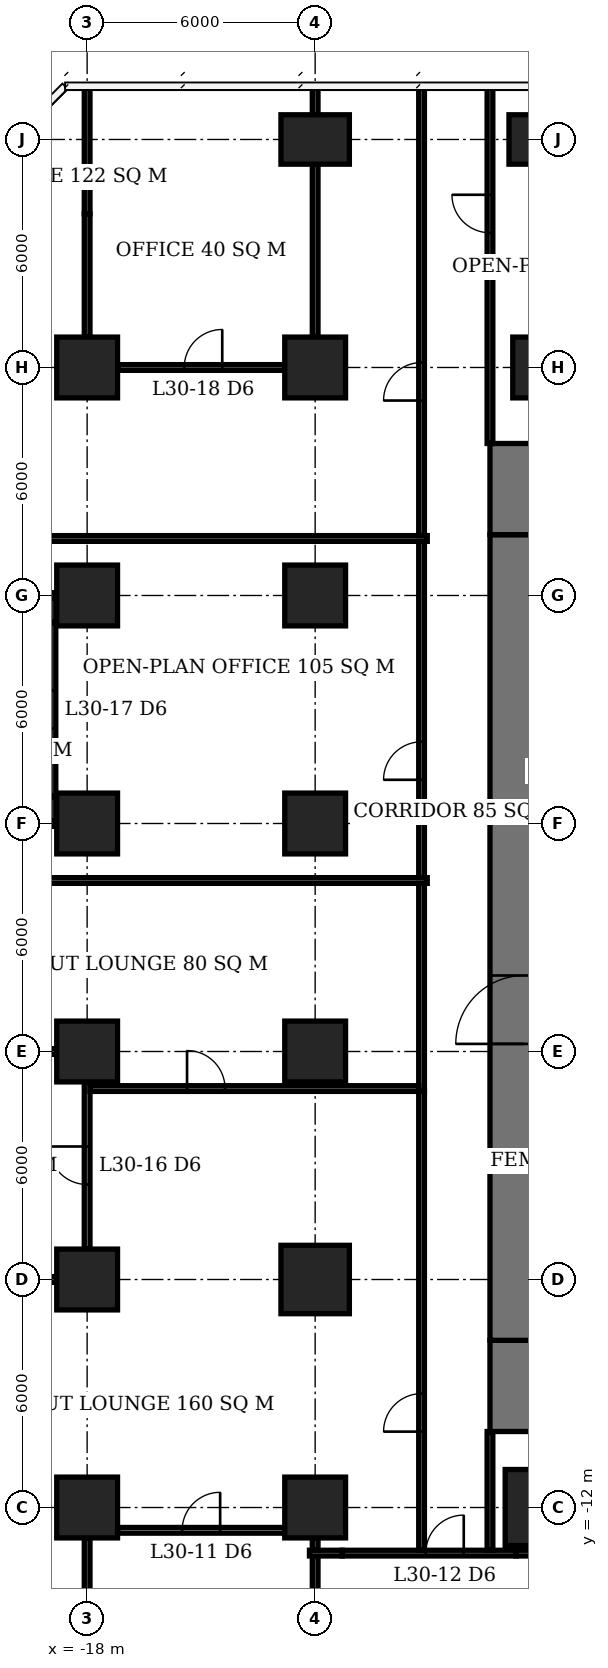
"""IFC4 building model, lengths in metres.
Left out: names, types, materials, properties, quantities, classifications, styles, units other than length and angle.
Written with IfcOpenShell. Run it as: python <this file> out.ifc"""

import sys

from ifc_helpers import new_model, si_unit, direction, frame, frame_2d, origin, origin_2d, place, context, subcontext, project, spatial, rectangle, extrude, element, fill, save


model = new_model("IFC4")
c1 = context("Model", 3, precision=1e-05, world=origin(), true_north=direction((0.0, 1.0)))
c2 = subcontext(c1, "Body", "Model", "MODEL_VIEW")
j1 = project(units=[si_unit("LENGTHUNIT", "METRE"), si_unit("PLANEANGLEUNIT", "RADIAN")], contexts=[c1])
p1 = place(None, origin())
s1 = spatial("IfcSite", under=j1, at=p1, CompositionType="ELEMENT")
p2 = place(p1, origin())
s2 = spatial("IfcBuilding", under=s1, at=p2, CompositionType="ELEMENT")
p3 = place(p2, frame((0.0, 0.0, 125.0)))
s3 = spatial("IfcBuildingStorey", under=s2, at=p3, CompositionType="ELEMENT", Elevation=125.0)
for number, where, z_axis, x_axis in (
    (1, (-18.0, -12.0, 0.0), (0.0, 0.0, 1.0), (1.0, 0.0, 0.0)),
    (2, (-18.0, -6.0, 0.0), (0.0, 0.0, 1.0), (1.0, 0.0, 0.0)),
    (3, (-18.0, 0.0, 0.0), (0.0, 0.0, 1.0), (1.0, 0.0, 0.0)),
    (4, (-18.0, 6.0, 0.0), (0.0, 0.0, 1.0), (1.0, 0.0, 0.0)),
    (5, (-18.0, 12.0, 0.0), (0.0, 0.0, 1.0), (1.0, 0.0, 0.0)),
    (6, (-18.0, 18.0, 0.0), (0.0, 0.0, 1.0), (1.0, 0.0, 0.0)),
    (7, (-12.0, -12.0, 0.0), (0.0, 0.0, 1.0), (1.0, 0.0, 0.0)),
):
    element("IfcColumn", number, at=place(p3, frame(where, z_axis=z_axis, x_axis=x_axis)), inside=s3, PredefinedType="COLUMN", context=c2, shape_type="SweptSolid", body=[
        extrude(rectangle(XDim=1.6, YDim=1.6, at=origin_2d()), origin(), (0.0, 0.0, 1.0), 3.9),
    ])
p4 = place(p3, frame((-12.0, -6.0, 0.0), z_axis=(0.0, 0.0, 1.0), x_axis=(1.0, 0.0, 0.0)))
e8 = element("IfcColumn", 8, at=p4, inside=s3, PredefinedType="COLUMN", context=c2, shape_type="SweptSolid", body=[
    extrude(rectangle(XDim=1.8, YDim=1.8, at=origin_2d()), origin(), (0.0, 0.0, 1.0), 3.9),
])
for number, where, z_axis, x_axis in (
    (9, (-12.0, 0.0, 0.0), (0.0, 0.0, 1.0), (1.0, 0.0, 0.0)),
    (10, (-12.0, 6.0, 0.0), (0.0, 0.0, 1.0), (1.0, 0.0, 0.0)),
    (11, (-12.0, 12.0, 0.0), (0.0, 0.0, 1.0), (1.0, 0.0, 0.0)),
    (12, (-12.0, 18.0, 0.0), (0.0, 0.0, 1.0), (1.0, 0.0, 0.0)),
):
    element("IfcColumn", number, at=place(p3, frame(where, z_axis=z_axis, x_axis=x_axis)), inside=s3, PredefinedType="COLUMN", context=c2, shape_type="SweptSolid", body=[
        extrude(rectangle(XDim=1.6, YDim=1.6, at=origin_2d()), origin(), (0.0, 0.0, 1.0), 3.9),
    ])
p5 = place(p3, frame((-12.0, 24.0, 0.0), z_axis=(0.0, 0.0, 1.0), x_axis=(1.0, 0.0, 0.0)))
e13 = element("IfcColumn", 13, at=p5, inside=s3, PredefinedType="COLUMN", context=c2, shape_type="SweptSolid", body=[
    extrude(rectangle(XDim=1.8, YDim=1.3, at=origin_2d()), origin(), (0.0, 0.0, 1.0), 3.9),
])
p6 = place(p3, frame((-6.0, -12.0, 0.0), z_axis=(0.0, 0.0, 1.0), x_axis=(1.0, 0.0, 0.0)))
e14 = element("IfcColumn", 14, at=p6, inside=s3, PredefinedType="COLUMN", context=c2, shape_type="SweptSolid", body=[
    extrude(rectangle(XDim=2.0, YDim=2.0, at=origin_2d()), origin(), (0.0, 0.0, 1.0), 3.9),
])
p7 = place(p3, frame((-6.0, 18.0, 0.0), z_axis=(0.0, 0.0, 1.0), x_axis=(1.0, 0.0, 0.0)))
e15 = element("IfcColumn", 15, at=p7, inside=s3, PredefinedType="COLUMN", context=c2, shape_type="SweptSolid", body=[
    extrude(rectangle(XDim=1.6, YDim=1.6, at=origin_2d()), origin(), (0.0, 0.0, 1.0), 3.9),
])
p8 = place(p3, frame((-6.0, 24.0, 0.0), z_axis=(0.0, 0.0, 1.0), x_axis=(1.0, 0.0, 0.0)))
e16 = element("IfcColumn", 16, at=p8, inside=s3, PredefinedType="COLUMN", context=c2, shape_type="SweptSolid", body=[
    extrude(rectangle(XDim=1.8, YDim=1.3, at=origin_2d()), origin(), (0.0, 0.0, 1.0), 3.9),
])
p9 = place(p3, frame((-6.5, -7.6, 0.0), z_axis=(0.0, 0.0, 1.0), x_axis=(0.0, 1.0, 0.0)))
e17 = element("IfcWall", 17, at=p9, inside=s3, PredefinedType="SHEAR", context=c2, shape_type="SweptSolid", body=[
    extrude(rectangle(XDim=21.2, YDim=1.8, at=frame_2d((10.6, 0.0))), origin(), (0.0, 0.0, 1.0), 3.9),
])
p10 = place(p9, frame((7.8, 0.0, 0.0)))
e18 = element("IfcOpeningElement", 18, at=p10, cuts=e17, PredefinedType="OPENING", context=c2, shape_type="SweptSolid", body=[
    extrude(rectangle(XDim=1.8, YDim=2.4, at=frame_2d((0.9, 1.2))), frame((0.0, 0.91, 0.0), z_axis=(0.0, -1.0, 0.0), x_axis=(1.0, 0.0, 0.0)), (0.0, 0.0, 1.0), 1.82),
])
for number, where, z_axis, x_axis in (
    (19, (-6.5, -10.0, 0.0), (0.0, 0.0, 1.0), (0.0, 1.0, 0.0)),
    (20, (-6.5, 13.6, 0.0), (0.0, 0.0, 1.0), (0.0, 1.0, 0.0)),
):
    element("IfcWall", number, at=place(p3, frame(where, z_axis=z_axis, x_axis=x_axis)), inside=s3, PredefinedType="SHEAR", context=c2, shape_type="SweptSolid", body=[
        extrude(rectangle(XDim=2.4, YDim=1.8, at=frame_2d((1.2, 0.0))), origin(), (0.0, 0.0, 1.0), 3.9),
    ])
p11 = place(p3, frame((-12.15, -13.2, 0.0), z_axis=(0.0, 0.0, 1.0), x_axis=(1.0, 0.0, 0.0)))
e21 = element("IfcWall", 21, at=p11, inside=s3, PredefinedType="PARTITIONING", context=c2, shape_type="SweptSolid", body=[
    extrude(rectangle(XDim=0.86, YDim=0.15, at=frame_2d((0.43, 0.0))), origin(), (0.0, 0.0, 1.0), 2.65),
])
p12 = place(p3, frame((-11.29, -13.2, 0.0), z_axis=(0.0, 0.0, 1.0), x_axis=(1.0, 0.0, 0.0)))
e22 = element("IfcWall", 22, at=p12, inside=s3, PredefinedType="PARTITIONING", context=c2, shape_type="SweptSolid", body=[
    extrude(rectangle(XDim=4.58, YDim=0.15, at=frame_2d((2.29, 0.0))), origin(), (0.0, 0.0, 1.0), 3.65),
])
p13 = place(p12, frame((2.2, 0.0, 0.0)))
e23 = element("IfcOpeningElement", 23, at=p13, cuts=e22, PredefinedType="OPENING", context=c2, shape_type="SweptSolid", body=[
    extrude(rectangle(XDim=1.0, YDim=2.1, at=frame_2d((0.5, 1.05))), frame((0.0, 0.085, 0.0), z_axis=(0.0, -1.0, 0.0), x_axis=(1.0, 0.0, 0.0)), (0.0, 0.0, 1.0), 0.17),
])
p14 = place(p3, frame((-6.71, -13.2, 0.0), z_axis=(0.0, 0.0, 1.0), x_axis=(1.0, 0.0, 0.0)))
e24 = element("IfcWall", 24, at=p14, inside=s3, PredefinedType="PARTITIONING", context=c2, shape_type="SweptSolid", body=[
    extrude(rectangle(XDim=0.785, YDim=0.15, at=frame_2d((0.393, 0.0))), origin(), (0.0, 0.0, 1.0), 2.65),
])
p15 = place(p3, frame((-17.2, -12.6, 0.0), z_axis=(0.0, 0.0, 1.0), x_axis=(1.0, 0.0, 0.0)))
e25 = element("IfcWall", 25, at=p15, inside=s3, PredefinedType="PARTITIONING", context=c2, shape_type="SweptSolid", body=[
    extrude(rectangle(XDim=4.4, YDim=0.15, at=frame_2d((2.2, 0.0))), origin(), (0.0, 0.0, 1.0), 3.65),
])
p16 = place(p15, frame((1.7, 0.0, 0.0)))
e26 = element("IfcOpeningElement", 26, at=p16, cuts=e25, PredefinedType="OPENING", context=c2, shape_type="SweptSolid", body=[
    extrude(rectangle(XDim=1.0, YDim=2.1, at=frame_2d((0.5, 1.05))), frame((0.0, 0.085, 0.0), z_axis=(0.0, -1.0, 0.0), x_axis=(1.0, 0.0, 0.0)), (0.0, 0.0, 1.0), 0.17),
])
for number, where, z_axis, x_axis in (
    (27, (-22.31, -6.0, 0.0), (0.0, 0.0, 1.0), (1.0, 0.0, 0.0)),
    (28, (-22.31, 0.0, 0.0), (0.0, 0.0, 1.0), (1.0, 0.0, 0.0)),
):
    element("IfcWall", number, at=place(p3, frame(where, z_axis=z_axis, x_axis=x_axis)), inside=s3, PredefinedType="PARTITIONING", context=c2, shape_type="SweptSolid", body=[
        extrude(rectangle(XDim=3.51, YDim=0.15, at=frame_2d((1.755, 0.0))), origin(), (0.0, 0.0, 1.0), 2.65),
    ])
for number, where, z_axis, x_axis in (
    (29, (-22.31, 6.0, 0.0), (0.0, 0.0, 1.0), (1.0, 0.0, 0.0)),
    (30, (-22.31, 12.0, 0.0), (0.0, 0.0, 1.0), (1.0, 0.0, 0.0)),
):
    element("IfcWall", number, at=place(p3, frame(where, z_axis=z_axis, x_axis=x_axis)), inside=s3, PredefinedType="PARTITIONING", context=c2, shape_type="SweptSolid", body=[
        extrude(rectangle(XDim=3.485, YDim=0.15, at=frame_2d((1.743, 0.0))), origin(), (0.0, 0.0, 1.0), 2.65),
    ])
p17 = place(p3, frame((-17.19, 18.0, 0.0), z_axis=(0.0, 0.0, 1.0), x_axis=(1.0, 0.0, 0.0)))
e31 = element("IfcWall", 31, at=p17, inside=s3, PredefinedType="PARTITIONING", context=c2, shape_type="SweptSolid", body=[
    extrude(rectangle(XDim=4.39, YDim=0.15, at=frame_2d((2.195, 0.0))), origin(), (0.0, 0.0, 1.0), 3.65),
])
p18 = place(p17, frame((1.745, 0.0, 0.0)))
e32 = element("IfcOpeningElement", 32, at=p18, cuts=e31, PredefinedType="OPENING", context=c2, shape_type="SweptSolid", body=[
    extrude(rectangle(XDim=1.0, YDim=2.1, at=frame_2d((0.5, 1.05))), frame((0.0, 0.085, 0.0), z_axis=(0.0, -1.0, 0.0), x_axis=(1.0, 0.0, 0.0)), (0.0, 0.0, 1.0), 0.17),
])
p19 = place(p3, frame((-18.9, 6.075, 0.0), z_axis=(0.0, 0.0, 1.0), x_axis=(0.0, 1.0, 0.0)))
e33 = element("IfcWall", 33, at=p19, inside=s3, PredefinedType="PARTITIONING", context=c2, shape_type="SweptSolid", body=[
    extrude(rectangle(XDim=0.635, YDim=0.15, at=frame_2d((0.317, 0.0))), origin(), (0.0, 0.0, 1.0), 2.65),
])
p20 = place(p3, frame((-18.9, 6.71, 0.0), z_axis=(0.0, 0.0, 1.0), x_axis=(0.0, 1.0, 0.0)))
e34 = element("IfcWall", 34, at=p20, inside=s3, PredefinedType="PARTITIONING", context=c2, shape_type="SweptSolid", body=[
    extrude(rectangle(XDim=4.58, YDim=0.15, at=frame_2d((2.29, 0.0))), origin(), (0.0, 0.0, 1.0), 3.65),
])
p21 = place(p20, frame((1.79, 0.0, 0.0)))
e35 = element("IfcOpeningElement", 35, at=p21, cuts=e34, PredefinedType="OPENING", context=c2, shape_type="SweptSolid", body=[
    extrude(rectangle(XDim=1.0, YDim=2.1, at=frame_2d((0.5, 1.05))), frame((0.0, 0.085, 0.0), z_axis=(0.0, -1.0, 0.0), x_axis=(1.0, 0.0, 0.0)), (0.0, 0.0, 1.0), 0.17),
])
p22 = place(p3, frame((-18.9, 11.29, 0.0), z_axis=(0.0, 0.0, 1.0), x_axis=(0.0, 1.0, 0.0)))
e36 = element("IfcWall", 36, at=p22, inside=s3, PredefinedType="PARTITIONING", context=c2, shape_type="SweptSolid", body=[
    extrude(rectangle(XDim=0.635, YDim=0.15, at=frame_2d((0.317, 0.0))), origin(), (0.0, 0.0, 1.0), 2.65),
])
p23 = place(p3, frame((-18.0, -16.31, 0.0), z_axis=(0.0, 0.0, 1.0), x_axis=(0.0, 1.0, 0.0)))
e37 = element("IfcWall", 37, at=p23, inside=s3, PredefinedType="PARTITIONING", context=c2, shape_type="SweptSolid", body=[
    extrude(rectangle(XDim=3.51, YDim=0.15, at=frame_2d((1.755, 0.0))), origin(), (0.0, 0.0, 1.0), 2.65),
])
p24 = place(p3, frame((-18.0, -5.2, 0.0), z_axis=(0.0, 0.0, 1.0), x_axis=(0.0, 1.0, 0.0)))
e38 = element("IfcWall", 38, at=p24, inside=s3, PredefinedType="PARTITIONING", context=c2, shape_type="SweptSolid", body=[
    extrude(rectangle(XDim=4.4, YDim=0.15, at=frame_2d((2.2, 0.0))), origin(), (0.0, 0.0, 1.0), 3.65),
])
p25 = place(p24, frame((1.7, 0.0, 0.0)))
e39 = element("IfcOpeningElement", 39, at=p25, cuts=e38, PredefinedType="OPENING", context=c2, shape_type="SweptSolid", body=[
    extrude(rectangle(XDim=1.0, YDim=2.1, at=frame_2d((0.5, 1.05))), frame((0.0, 0.085, 0.0), z_axis=(0.0, -1.0, 0.0), x_axis=(1.0, 0.0, 0.0)), (0.0, 0.0, 1.0), 0.17),
])
p26 = place(p3, frame((-18.0, 18.8, 0.0), z_axis=(0.0, 0.0, 1.0), x_axis=(0.0, 1.0, 0.0)))
e40 = element("IfcWall", 40, at=p26, inside=s3, PredefinedType="PARTITIONING", context=c2, shape_type="SweptSolid", body=[
    extrude(rectangle(XDim=3.245, YDim=0.15, at=frame_2d((1.623, 0.0))), origin(), (0.0, 0.0, 1.0), 2.65),
])
p27 = place(p3, frame((-18.0, 22.045, 0.0), z_axis=(0.0, 0.0, 1.0), x_axis=(0.0, 1.0, 0.0)))
e41 = element("IfcWall", 41, at=p27, inside=s3, PredefinedType="PARTITIONING", context=c2, shape_type="SweptSolid", body=[
    extrude(rectangle(XDim=3.355, YDim=0.15, at=frame_2d((1.677, 0.0))), origin(), (0.0, 0.0, 1.0), 3.65),
])
p28 = place(p3, frame((-12.0, -16.31, 0.0), z_axis=(0.0, 0.0, 1.0), x_axis=(0.0, 1.0, 0.0)))
e42 = element("IfcWall", 42, at=p28, inside=s3, PredefinedType="PARTITIONING", context=c2, shape_type="SweptSolid", body=[
    extrude(rectangle(XDim=3.035, YDim=0.15, at=frame_2d((1.518, 0.0))), origin(), (0.0, 0.0, 1.0), 2.65),
])
p29 = place(p3, frame((-12.0, -13.125, 0.0), z_axis=(0.0, 0.0, 1.0), x_axis=(0.0, 1.0, 0.0)))
e43 = element("IfcWall", 43, at=p29, inside=s3, PredefinedType="PARTITIONING", context=c2, shape_type="SweptSolid", body=[
    extrude(rectangle(XDim=0.325, YDim=0.15, at=frame_2d((0.163, 0.0))), origin(), (0.0, 0.0, 1.0), 2.65),
])
p30 = place(p3, frame((-12.0, 18.8, 0.0), z_axis=(0.0, 0.0, 1.0), x_axis=(0.0, 1.0, 0.0)))
e44 = element("IfcWall", 44, at=p30, inside=s3, PredefinedType="PARTITIONING", context=c2, shape_type="SweptSolid", body=[
    extrude(rectangle(XDim=4.55, YDim=0.15, at=frame_2d((2.275, 0.0))), origin(), (0.0, 0.0, 1.0), 3.65),
])
p31 = place(p3, frame((-12.0, 24.65, 0.0), z_axis=(0.0, 0.0, 1.0), x_axis=(0.0, 1.0, 0.0)))
e45 = element("IfcWall", 45, at=p31, inside=s3, PredefinedType="PARTITIONING", context=c2, shape_type="SweptSolid", body=[
    extrude(rectangle(XDim=0.75, YDim=0.15, at=frame_2d((0.375, 0.0))), origin(), (0.0, 0.0, 1.0), 3.65),
])
for number, where, z_axis, x_axis in (
    (46, (-21.59, 4.5, 0.0), (0.0, 0.0, 1.0), (1.0, 0.0, 0.0)),
    (47, (-21.59, 13.5, 0.0), (0.0, 0.0, 1.0), (1.0, 0.0, 0.0)),
):
    element("IfcWall", number, at=place(p3, frame(where, z_axis=z_axis, x_axis=x_axis)), inside=s3, PredefinedType="PARTITIONING", context=c2, shape_type="SweptSolid", body=[
        extrude(rectangle(XDim=12.54, YDim=0.15, at=frame_2d((6.27, 0.0))), origin(), (0.0, 0.0, 1.0), 3.65),
    ])
p32 = place(p3, frame((-17.925, -0.975, 0.0), z_axis=(0.0, 0.0, 1.0), x_axis=(1.0, 0.0, 0.0)))
e48 = element("IfcWall", 48, at=p32, inside=s3, PredefinedType="PARTITIONING", context=c2, shape_type="SweptSolid", body=[
    extrude(rectangle(XDim=8.65, YDim=0.15, at=frame_2d((4.325, 0.0))), origin(), (0.0, 0.0, 1.0), 3.65),
])
p33 = place(p32, frame((2.554, 0.0, 0.0)))
e49 = element("IfcOpeningElement", 49, at=p33, cuts=e48, PredefinedType="OPENING", context=c2, shape_type="SweptSolid", body=[
    extrude(rectangle(XDim=1.0, YDim=2.1, at=frame_2d((0.5, 1.05))), frame((0.0, 0.085, 0.0), z_axis=(0.0, -1.0, 0.0), x_axis=(1.0, 0.0, 0.0)), (0.0, 0.0, 1.0), 0.17),
])
p34 = place(p3, frame((-9.2, -13.125, 0.0), z_axis=(0.0, 0.0, 1.0), x_axis=(0.0, 1.0, 0.0)))
e50 = element("IfcWall", 50, at=p34, inside=s3, PredefinedType="PARTITIONING", context=c2, shape_type="SweptSolid", body=[
    extrude(rectangle(XDim=12.075, YDim=0.15, at=frame_2d((6.038, 0.0))), origin(), (0.0, 0.0, 1.0), 3.65),
])
p35 = place(p34, frame((3.122, 0.0, 0.0)))
e51 = element("IfcOpeningElement", 51, at=p35, cuts=e50, PredefinedType="OPENING", context=c2, shape_type="SweptSolid", body=[
    extrude(rectangle(XDim=1.0, YDim=2.1, at=frame_2d((0.5, 1.05))), frame((0.0, 0.085, 0.0), z_axis=(0.0, -1.0, 0.0), x_axis=(1.0, 0.0, 0.0)), (0.0, 0.0, 1.0), 0.17),
])
p36 = place(p3, frame((-9.2, -1.05, 0.0), z_axis=(0.0, 0.0, 1.0), x_axis=(0.0, 1.0, 0.0)))
e52 = element("IfcWall", 52, at=p36, inside=s3, PredefinedType="PARTITIONING", context=c2, shape_type="SweptSolid", body=[
    extrude(rectangle(XDim=5.475, YDim=0.15, at=frame_2d((2.738, 0.0))), origin(), (0.0, 0.0, 1.0), 3.65),
])
p37 = place(p3, frame((-9.2, 4.575, 0.0), z_axis=(0.0, 0.0, 1.0), x_axis=(0.0, 1.0, 0.0)))
e53 = element("IfcWall", 53, at=p37, inside=s3, PredefinedType="PARTITIONING", context=c2, shape_type="SweptSolid", body=[
    extrude(rectangle(XDim=8.85, YDim=0.15, at=frame_2d((4.425, 0.0))), origin(), (0.0, 0.0, 1.0), 3.65),
])
p38 = place(p37, frame((2.575, 0.0, 0.0)))
e54 = element("IfcOpeningElement", 54, at=p38, cuts=e53, PredefinedType="OPENING", context=c2, shape_type="SweptSolid", body=[
    extrude(rectangle(XDim=1.0, YDim=2.1, at=frame_2d((0.5, 1.05))), frame((0.0, 0.085, 0.0), z_axis=(0.0, -1.0, 0.0), x_axis=(1.0, 0.0, 0.0)), (0.0, 0.0, 1.0), 0.17),
])
p39 = place(p3, frame((-9.2, 13.575, 0.0), z_axis=(0.0, 0.0, 1.0), x_axis=(0.0, 1.0, 0.0)))
e55 = element("IfcWall", 55, at=p39, inside=s3, PredefinedType="PARTITIONING", context=c2, shape_type="SweptSolid", body=[
    extrude(rectangle(XDim=11.775, YDim=0.15, at=frame_2d((5.888, 0.0))), origin(), (0.0, 0.0, 1.0), 3.65),
])
p40 = place(p39, frame((3.555, 0.0, 0.0)))
e56 = element("IfcOpeningElement", 56, at=p40, cuts=e55, PredefinedType="OPENING", context=c2, shape_type="SweptSolid", body=[
    extrude(rectangle(XDim=1.0, YDim=2.1, at=frame_2d((0.5, 1.05))), frame((0.0, 0.085, 0.0), z_axis=(0.0, -1.0, 0.0), x_axis=(1.0, 0.0, 0.0)), (0.0, 0.0, 1.0), 0.17),
])
p41 = place(p3, frame((-7.4, -13.125, 0.0), z_axis=(0.0, 0.0, 1.0), x_axis=(0.0, 1.0, 0.0)))
e57 = element("IfcWall", 57, at=p41, inside=s3, PredefinedType="PARTITIONING", context=c2, shape_type="SweptSolid", body=[
    extrude(rectangle(XDim=3.125, YDim=0.15, at=frame_2d((1.562, 0.0))), origin(), (0.0, 0.0, 1.0), 3.65),
])
p42 = place(p3, frame((-7.4, 16.0, 0.0), z_axis=(0.0, 0.0, 1.0), x_axis=(0.0, 1.0, 0.0)))
e58 = element("IfcWall", 58, at=p42, inside=s3, PredefinedType="PARTITIONING", context=c2, shape_type="SweptSolid", body=[
    extrude(rectangle(XDim=9.4, YDim=0.15, at=frame_2d((4.7, 0.0))), origin(), (0.0, 0.0, 1.0), 3.65),
])
p43 = place(p42, frame((5.545, 0.0, 0.0)))
e59 = element("IfcOpeningElement", 59, at=p43, cuts=e58, PredefinedType="OPENING", context=c2, shape_type="SweptSolid", body=[
    extrude(rectangle(XDim=1.0, YDim=2.1, at=frame_2d((0.5, 1.05))), frame((0.0, 0.085, 0.0), z_axis=(0.0, -1.0, 0.0), x_axis=(1.0, 0.0, 0.0)), (0.0, 0.0, 1.0), 0.17),
])
p44 = place(p10, origin())
e60 = element("IfcDoor", 60, at=p44, inside=s3, OperationType="DOUBLE_DOOR_SINGLE_SWING", PredefinedType="DOOR", context=c2, shape_type="SweptSolid", body=[
    extrude(rectangle(XDim=1.8, YDim=2.4, at=frame_2d((0.9, 1.2))), frame((0.0, 0.025, 0.0), z_axis=(0.0, -1.0, 0.0), x_axis=(1.0, 0.0, 0.0)), (0.0, 0.0, 1.0), 0.05),
])
fill(e18, e60)
p45 = place(p16, origin())
e61 = element("IfcDoor", 61, at=p45, inside=s3, OperationType="SINGLE_SWING_RIGHT", PredefinedType="DOOR", context=c2, shape_type="SweptSolid", body=[
    extrude(rectangle(XDim=1.0, YDim=2.1, at=frame_2d((0.5, 1.05))), frame((0.0, 0.025, 0.0), z_axis=(0.0, -1.0, 0.0), x_axis=(1.0, 0.0, 0.0)), (0.0, 0.0, 1.0), 0.05),
])
fill(e26, e61)
p46 = place(p13, origin())
e62 = element("IfcDoor", 62, at=p46, inside=s3, OperationType="SINGLE_SWING_RIGHT", PredefinedType="DOOR", context=c2, shape_type="SweptSolid", body=[
    extrude(rectangle(XDim=1.0, YDim=2.1, at=frame_2d((0.5, 1.05))), frame((0.0, 0.025, 0.0), z_axis=(0.0, -1.0, 0.0), x_axis=(1.0, 0.0, 0.0)), (0.0, 0.0, 1.0), 0.05),
])
fill(e23, e62)
p47 = place(p25, origin())
e63 = element("IfcDoor", 63, at=p47, inside=s3, OperationType="SINGLE_SWING_RIGHT", PredefinedType="DOOR", context=c2, shape_type="SweptSolid", body=[
    extrude(rectangle(XDim=1.0, YDim=2.1, at=frame_2d((0.5, 1.05))), frame((0.0, 0.025, 0.0), z_axis=(0.0, -1.0, 0.0), x_axis=(1.0, 0.0, 0.0)), (0.0, 0.0, 1.0), 0.05),
])
fill(e39, e63)
p48 = place(p21, origin())
e64 = element("IfcDoor", 64, at=p48, inside=s3, OperationType="SINGLE_SWING_RIGHT", PredefinedType="DOOR", context=c2, shape_type="SweptSolid", body=[
    extrude(rectangle(XDim=1.0, YDim=2.1, at=frame_2d((0.5, 1.05))), frame((0.0, 0.025, 0.0), z_axis=(0.0, -1.0, 0.0), x_axis=(1.0, 0.0, 0.0)), (0.0, 0.0, 1.0), 0.05),
])
fill(e35, e64)
p49 = place(p18, origin())
e65 = element("IfcDoor", 65, at=p49, inside=s3, OperationType="SINGLE_SWING_RIGHT", PredefinedType="DOOR", context=c2, shape_type="SweptSolid", body=[
    extrude(rectangle(XDim=1.0, YDim=2.1, at=frame_2d((0.5, 1.05))), frame((0.0, 0.025, 0.0), z_axis=(0.0, -1.0, 0.0), x_axis=(1.0, 0.0, 0.0)), (0.0, 0.0, 1.0), 0.05),
])
fill(e32, e65)
p50 = place(p35, origin())
e66 = element("IfcDoor", 66, at=p50, inside=s3, OperationType="SINGLE_SWING_LEFT", PredefinedType="DOOR", context=c2, shape_type="SweptSolid", body=[
    extrude(rectangle(XDim=1.0, YDim=2.1, at=frame_2d((0.5, 1.05))), frame((0.0, 0.025, 0.0), z_axis=(0.0, -1.0, 0.0), x_axis=(1.0, 0.0, 0.0)), (0.0, 0.0, 1.0), 0.05),
])
fill(e51, e66)
p51 = place(p33, origin())
e67 = element("IfcDoor", 67, at=p51, inside=s3, OperationType="SINGLE_SWING_LEFT", PredefinedType="DOOR", context=c2, shape_type="SweptSolid", body=[
    extrude(rectangle(XDim=1.0, YDim=2.1, at=frame_2d((0.5, 1.05))), frame((0.0, 0.025, 0.0), z_axis=(0.0, -1.0, 0.0), x_axis=(1.0, 0.0, 0.0)), (0.0, 0.0, 1.0), 0.05),
])
fill(e49, e67)
p52 = place(p38, origin())
e68 = element("IfcDoor", 68, at=p52, inside=s3, OperationType="SINGLE_SWING_LEFT", PredefinedType="DOOR", context=c2, shape_type="SweptSolid", body=[
    extrude(rectangle(XDim=1.0, YDim=2.1, at=frame_2d((0.5, 1.05))), frame((0.0, 0.025, 0.0), z_axis=(0.0, -1.0, 0.0), x_axis=(1.0, 0.0, 0.0)), (0.0, 0.0, 1.0), 0.05),
])
fill(e54, e68)
p53 = place(p40, origin())
e69 = element("IfcDoor", 69, at=p53, inside=s3, OperationType="SINGLE_SWING_LEFT", PredefinedType="DOOR", context=c2, shape_type="SweptSolid", body=[
    extrude(rectangle(XDim=1.0, YDim=2.1, at=frame_2d((0.5, 1.05))), frame((0.0, 0.025, 0.0), z_axis=(0.0, -1.0, 0.0), x_axis=(1.0, 0.0, 0.0)), (0.0, 0.0, 1.0), 0.05),
])
fill(e56, e69)
p54 = place(p43, origin())
e70 = element("IfcDoor", 70, at=p54, inside=s3, OperationType="SINGLE_SWING_RIGHT", PredefinedType="DOOR", context=c2, shape_type="SweptSolid", body=[
    extrude(rectangle(XDim=1.0, YDim=2.1, at=frame_2d((0.5, 1.05))), frame((0.0, 0.025, 0.0), z_axis=(0.0, -1.0, 0.0), x_axis=(1.0, 0.0, 0.0)), (0.0, 0.0, 1.0), 0.05),
])
fill(e59, e70)
save(model, sys.argv[1])
